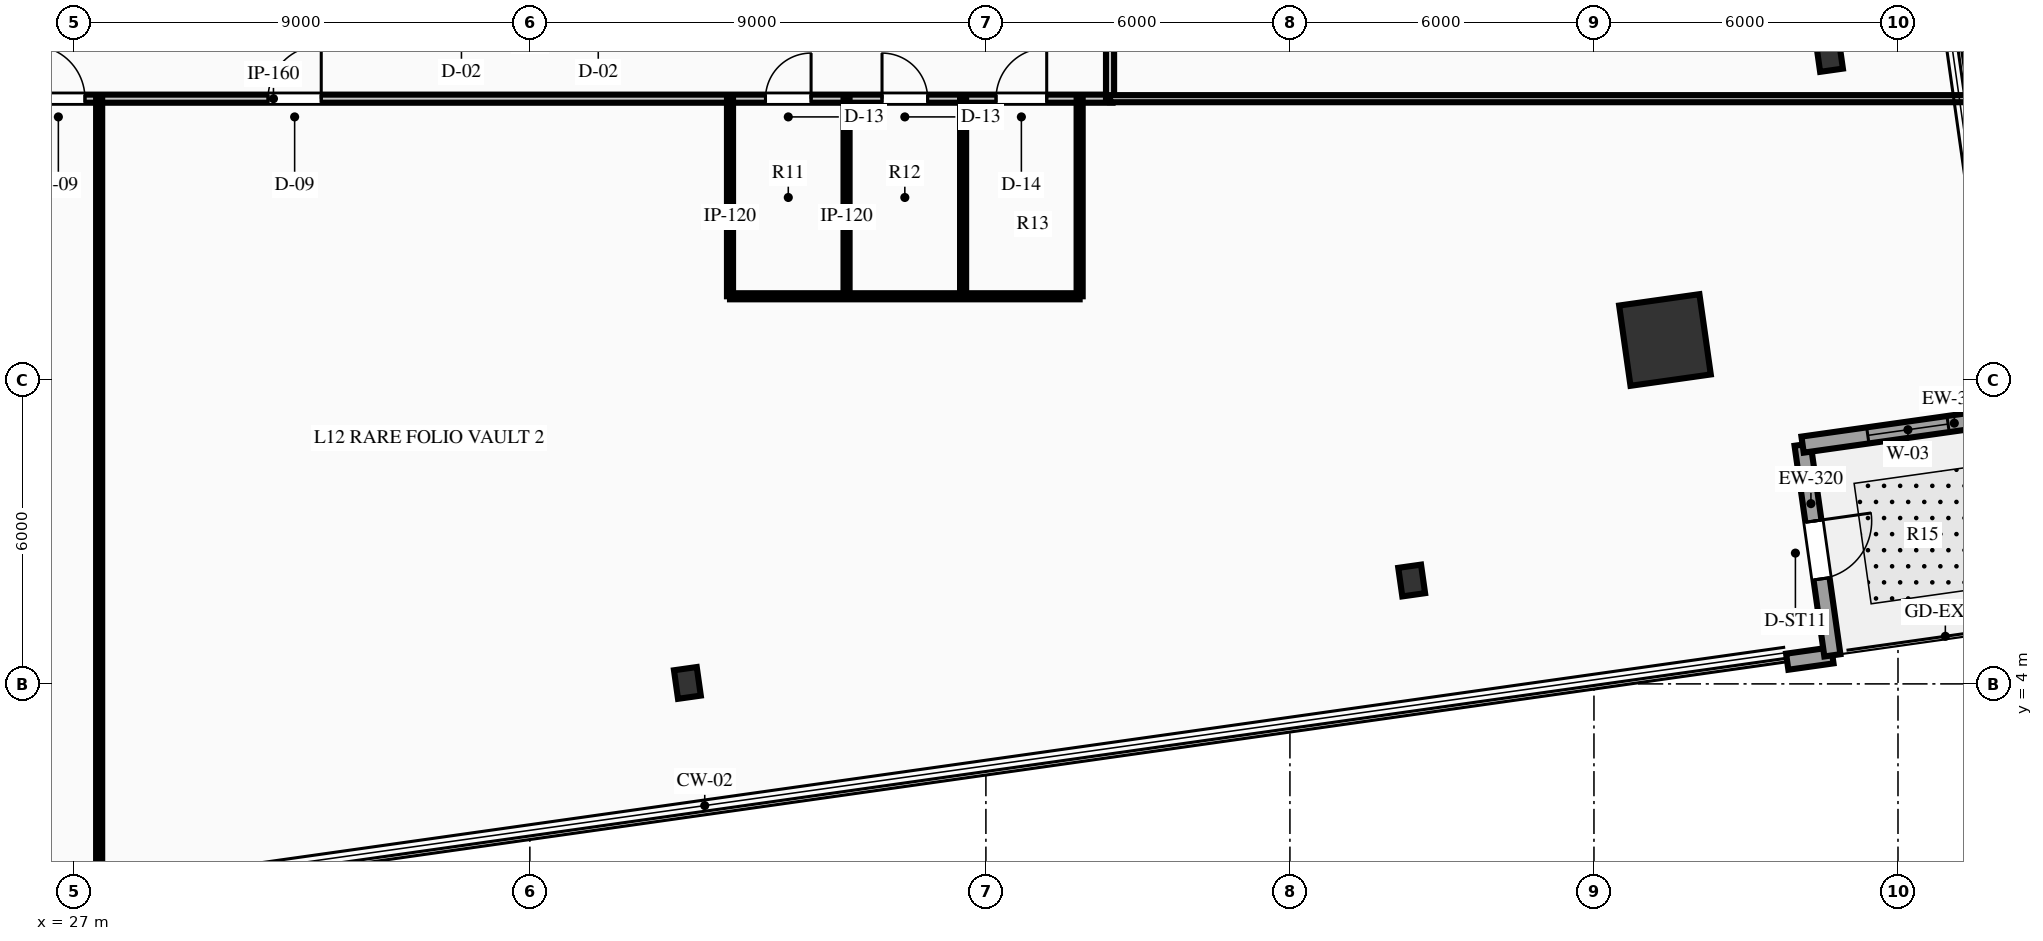
"""IFC4 building model, lengths in metres.
Left out: names, types, materials, properties, quantities, classifications, styles, units other than length and angle.
Written with IfcOpenShell. Run it as: python <this file> out.ifc"""

import sys

from ifc_helpers import new_model, si_unit, direction, frame, frame_2d, origin, origin_2d, place, context, subcontext, project, spatial, rectangle, hollow_rectangle, i_section, extrude, element, fill, save


model = new_model("IFC4")
c1 = context("Model", 3, precision=1e-05, world=origin(), true_north=direction((0.0, 1.0)))
c2 = subcontext(c1, "Body", "Model", "MODEL_VIEW")
j1 = project(units=[si_unit("LENGTHUNIT", "METRE"), si_unit("PLANEANGLEUNIT", "RADIAN")], contexts=[c1])
p1 = place(None, origin())
s1 = spatial("IfcSite", under=j1, at=p1, CompositionType="ELEMENT")
p2 = place(p1, origin())
s2 = spatial("IfcBuilding", under=s1, at=p2, CompositionType="ELEMENT")
p3 = place(p2, frame((0.0, 0.0, 55.2)))
s3 = spatial("IfcBuildingStorey", under=s2, at=p3, CompositionType="ELEMENT", Elevation=55.2)
p4 = place(p3, frame((58.401, 10.787, 0.0), z_axis=(0.0, 0.0, 1.0), x_axis=(0.990146240249, 0.140037219771, 0.0)))
e1 = element("IfcColumn", 1, at=p4, inside=s3, PredefinedType="COLUMN", context=c2, shape_type="SweptSolid", body=[
    extrude(hollow_rectangle(XDim=1.6, YDim=1.6, WallThickness=0.08, at=origin_2d()), origin(), (0.0, 0.0, 1.0), 3.75),
])
for number, where, z_axis, x_axis in (
    (2, (39.109, 4.019, 0.0), (0.0, 0.0, 1.0), (0.99, 0.14, 0.0)),
    (3, (53.403, 6.04, 0.0), (0.0, 0.0, 1.0), (0.99, 0.14, 0.0)),
    (4, (61.648, 16.393, 0.0), (0.0, 0.0, 1.0), (0.99, 0.14, 0.0)),
):
    element("IfcColumn", number, at=place(p3, frame(where, z_axis=z_axis, x_axis=x_axis)), inside=s3, PredefinedType="COLUMN", context=c2, shape_type="SweptSolid", body=[
        extrude(i_section(OverallWidth=0.454, OverallDepth=0.569, WebThickness=0.078, FlangeThickness=0.125, at=origin_2d()), origin(), (0.0, 0.0, 1.0), 3.75),
    ])
p5 = place(p3, frame((61.705, 4.563, 0.0), z_axis=(0.0, 0.0, 1.0), x_axis=(-0.990149293409, -0.140015630419, 0.0)))
e5 = element("IfcWall", 5, at=p5, inside=s3, PredefinedType="STANDARD", context=c2, shape_type="SweptSolid", body=[
    extrude(rectangle(XDim=0.9, YDim=0.32, at=frame_2d((0.45, 0.0))), origin(), (0.0, 0.0, 1.0), 3.44),
])
p6 = place(p3, frame((61.117, 8.722, 0.0), z_axis=(0.0, 0.0, 1.0), x_axis=(0.139972650661, -0.990155370165, 0.0)))
e6 = element("IfcWall", 6, at=p6, inside=s3, PredefinedType="STANDARD", context=c2, shape_type="SweptSolid", body=[
    extrude(rectangle(XDim=4.2, YDim=0.32, at=frame_2d((2.1, 0.0))), origin(), (0.0, 0.0, 1.0), 3.44),
])
p7 = place(p6, frame((1.525, 0.0, 0.0)))
e7 = element("IfcOpeningElement", 7, at=p7, cuts=e6, PredefinedType="OPENING", context=c2, shape_type="SweptSolid", body=[
    extrude(rectangle(XDim=1.15, YDim=2.2, at=frame_2d((0.575, 1.1))), frame((0.0, 0.17, 0.0), z_axis=(0.0, -1.0, 0.0), x_axis=(1.0, 0.0, 0.0)), (0.0, 0.0, 1.0), 0.34),
])
p8 = place(p3, frame((65.276, 9.31, 0.0), z_axis=(0.0, 0.0, 1.0), x_axis=(-0.990146172451, -0.140037699139, 0.0)))
e8 = element("IfcWall", 8, at=p8, inside=s3, PredefinedType="STANDARD", context=c2, shape_type="SweptSolid", body=[
    extrude(rectangle(XDim=4.2, YDim=0.32, at=frame_2d((2.1, 0.0))), origin(), (0.0, 0.0, 1.0), 3.44),
])
p9 = place(p8, frame((1.3, 0.0, 0.85)))
e9 = element("IfcOpeningElement", 9, at=p9, cuts=e8, PredefinedType="OPENING", context=c2, shape_type="SweptSolid", body=[
    extrude(rectangle(XDim=1.6, YDim=2.1, at=frame_2d((0.8, 1.05))), frame((0.0, 0.17, 0.0), z_axis=(0.0, -1.0, 0.0), x_axis=(1.0, 0.0, 0.0)), (0.0, 0.0, 1.0), 0.34),
])
p10 = place(p3, frame((24.5, 15.55, 0.0), z_axis=(0.0, 0.0, 1.0), x_axis=(1.0, 0.0, 0.0)))
e10 = element("IfcWall", 10, at=p10, inside=s3, PredefinedType="PARTITIONING", context=c2, shape_type="SweptSolid", body=[
    extrude(rectangle(XDim=23.0, YDim=0.16, at=frame_2d((11.5, 0.0))), origin(), (0.0, 0.0, 1.0), 3.44),
])
p11 = place(p10, frame((16.15, 0.0, 0.0)))
e11 = element("IfcOpeningElement", 11, at=p11, cuts=e10, PredefinedType="OPENING", context=c2, shape_type="SweptSolid", body=[
    extrude(rectangle(XDim=0.9, YDim=2.15, at=frame_2d((0.45, 1.075))), frame((0.0, 0.09, 0.0), z_axis=(0.0, -1.0, 0.0), x_axis=(1.0, 0.0, 0.0)), (0.0, 0.0, 1.0), 0.18),
])
p12 = place(p10, frame((18.45, 0.0, 0.0)))
e12 = element("IfcOpeningElement", 12, at=p12, cuts=e10, PredefinedType="OPENING", context=c2, shape_type="SweptSolid", body=[
    extrude(rectangle(XDim=0.9, YDim=2.15, at=frame_2d((0.45, 1.075))), frame((0.0, 0.09, 0.0), z_axis=(0.0, -1.0, 0.0), x_axis=(1.0, 0.0, 0.0)), (0.0, 0.0, 1.0), 0.18),
])
p13 = place(p10, frame((20.7, 0.0, 0.0)))
e13 = element("IfcOpeningElement", 13, at=p13, cuts=e10, PredefinedType="OPENING", context=c2, shape_type="SweptSolid", body=[
    extrude(rectangle(XDim=1.0, YDim=2.15, at=frame_2d((0.5, 1.075))), frame((0.0, 0.09, 0.0), z_axis=(0.0, -1.0, 0.0), x_axis=(1.0, 0.0, 0.0)), (0.0, 0.0, 1.0), 0.18),
])
p14 = place(p10, frame((1.67, 0.0, 0.0)))
e14 = element("IfcOpeningElement", 14, at=p14, cuts=e10, PredefinedType="OPENING", context=c2, shape_type="SweptSolid", body=[
    extrude(rectangle(XDim=1.05, YDim=2.15, at=frame_2d((0.525, 1.075))), frame((0.0, 0.09, 0.0), z_axis=(0.0, -1.0, 0.0), x_axis=(1.0, 0.0, 0.0)), (0.0, 0.0, 1.0), 0.18),
])
p15 = place(p10, frame((6.333, 0.0, 0.0)))
e15 = element("IfcOpeningElement", 15, at=p15, cuts=e10, PredefinedType="OPENING", context=c2, shape_type="SweptSolid", body=[
    extrude(rectangle(XDim=1.05, YDim=2.15, at=frame_2d((0.525, 1.075))), frame((0.0, 0.09, 0.0), z_axis=(0.0, -1.0, 0.0), x_axis=(1.0, 0.0, 0.0)), (0.0, 0.0, 1.0), 0.18),
])
p16 = place(p3, frame((47.45, 15.55, 0.0), z_axis=(0.0, 0.0, 1.0), x_axis=(0.0, 1.0, 0.0)))
e16 = element("IfcWall", 16, at=p16, inside=s3, PredefinedType="PARTITIONING", context=c2, shape_type="SweptSolid", body=[
    extrude(rectangle(XDim=20.9, YDim=0.16, at=frame_2d((10.45, 0.0))), origin(), (0.0, 0.0, 1.0), 3.44),
])
p17 = place(p16, frame((14.975, 0.0, 0.0)))
e17 = element("IfcOpeningElement", 17, at=p17, cuts=e16, PredefinedType="OPENING", context=c2, shape_type="SweptSolid", body=[
    extrude(rectangle(XDim=0.95, YDim=2.15, at=frame_2d((0.475, 1.075))), frame((0.0, 0.09, 0.0), z_axis=(0.0, -1.0, 0.0), x_axis=(1.0, 0.0, 0.0)), (0.0, 0.0, 1.0), 0.18),
])
p18 = place(p16, frame((5.54, 0.0, 0.0)))
e18 = element("IfcOpeningElement", 18, at=p18, cuts=e16, PredefinedType="OPENING", context=c2, shape_type="SweptSolid", body=[
    extrude(rectangle(XDim=1.05, YDim=2.15, at=frame_2d((0.525, 1.075))), frame((0.0, 0.09, 0.0), z_axis=(0.0, -1.0, 0.0), x_axis=(1.0, 0.0, 0.0)), (0.0, 0.0, 1.0), 0.18),
])
p19 = place(p16, frame((9.791, 0.0, 0.0)))
e19 = element("IfcOpeningElement", 19, at=p19, cuts=e16, PredefinedType="OPENING", context=c2, shape_type="SweptSolid", body=[
    extrude(rectangle(XDim=1.05, YDim=2.15, at=frame_2d((0.525, 1.075))), frame((0.0, 0.09, 0.0), z_axis=(0.0, -1.0, 0.0), x_axis=(1.0, 0.0, 0.0)), (0.0, 0.0, 1.0), 0.18),
])
for number, where, z_axis, x_axis in (
    (20, (39.95, 11.65, 0.0), (0.0, 0.0, 1.0), (0.0, 1.0, 0.0)),
    (21, (42.25, 11.65, 0.0), (0.0, 0.0, 1.0), (0.0, 1.0, 0.0)),
    (22, (44.55, 11.65, 0.0), (0.0, 0.0, 1.0), (0.0, 1.0, 0.0)),
    (23, (46.85, 11.65, 0.0), (0.0, 0.0, 1.0), (0.0, 1.0, 0.0)),
):
    element("IfcWall", number, at=place(p3, frame(where, z_axis=z_axis, x_axis=x_axis)), inside=s3, PredefinedType="PARTITIONING", context=c2, shape_type="SweptSolid", body=[
        extrude(rectangle(XDim=3.9, YDim=0.12, at=frame_2d((1.95, 0.0))), origin(), (0.0, 0.0, 1.0), 3.44),
    ])
p20 = place(p3, frame((39.95, 11.65, 0.0), z_axis=(0.0, 0.0, 1.0), x_axis=(1.0, 0.0, 0.0)))
e24 = element("IfcWall", 24, at=p20, inside=s3, PredefinedType="PARTITIONING", context=c2, shape_type="SweptSolid", body=[
    extrude(rectangle(XDim=6.9, YDim=0.12, at=frame_2d((3.45, 0.0))), origin(), (0.0, 0.0, 1.0), 3.44),
])
p21 = place(p3, frame((47.45, 15.55, 0.0), z_axis=(0.0, 0.0, 1.0), x_axis=(1.0, 0.0, 0.0)))
e25 = element("IfcWall", 25, at=p21, inside=s3, PredefinedType="PARTITIONING", context=c2, shape_type="SweptSolid", body=[
    extrude(rectangle(XDim=16.903, YDim=0.14, at=frame_2d((8.451, 0.0))), origin(), (0.0, 0.0, 1.0), 3.44),
])
p22 = place(p3, frame((27.5, -0.234, 0.0), z_axis=(0.0, 0.0, 1.0), x_axis=(0.0, 1.0, 0.0)))
e26 = element("IfcWall", 26, at=p22, inside=s3, PredefinedType="PARTITIONING", context=c2, shape_type="SweptSolid", body=[
    extrude(rectangle(XDim=15.784, YDim=0.12, at=frame_2d((7.892, 0.0))), origin(), (0.0, 0.0, 1.0), 3.44),
])
p23 = place(p7, origin())
e27 = element("IfcDoor", 27, at=p23, inside=s3, OperationType="SINGLE_SWING_LEFT", PredefinedType="DOOR", context=c2, shape_type="SweptSolid", body=[
    extrude(rectangle(XDim=1.15, YDim=2.2, at=frame_2d((0.575, 1.1))), frame((0.0, 0.025, 0.0), z_axis=(0.0, -1.0, 0.0), x_axis=(1.0, 0.0, 0.0)), (0.0, 0.0, 1.0), 0.05),
])
fill(e7, e27)
p24 = place(p9, origin())
e28 = element("IfcWindow", 28, at=p24, inside=s3, PartitioningType="SINGLE_PANEL", PredefinedType="WINDOW", context=c2, shape_type="SweptSolid", body=[
    extrude(rectangle(XDim=1.6, YDim=2.1, at=frame_2d((0.8, 1.05))), frame((0.0, 0.03, 0.0), z_axis=(0.0, -1.0, 0.0), x_axis=(1.0, 0.0, 0.0)), (0.0, 0.0, 1.0), 0.06),
])
fill(e9, e28)
p25 = place(p11, origin())
e29 = element("IfcDoor", 29, at=p25, inside=s3, OperationType="SINGLE_SWING_RIGHT", PredefinedType="DOOR", context=c2, shape_type="SweptSolid", body=[
    extrude(rectangle(XDim=0.9, YDim=2.15, at=frame_2d((0.45, 1.075))), frame((0.0, 0.025, 0.0), z_axis=(0.0, -1.0, 0.0), x_axis=(1.0, 0.0, 0.0)), (0.0, 0.0, 1.0), 0.05),
])
fill(e11, e29)
p26 = place(p12, origin())
e30 = element("IfcDoor", 30, at=p26, inside=s3, OperationType="SINGLE_SWING_LEFT", PredefinedType="DOOR", context=c2, shape_type="SweptSolid", body=[
    extrude(rectangle(XDim=0.9, YDim=2.15, at=frame_2d((0.45, 1.075))), frame((0.0, 0.025, 0.0), z_axis=(0.0, -1.0, 0.0), x_axis=(1.0, 0.0, 0.0)), (0.0, 0.0, 1.0), 0.05),
])
fill(e12, e30)
p27 = place(p13, origin())
e31 = element("IfcDoor", 31, at=p27, inside=s3, OperationType="SINGLE_SWING_RIGHT", PredefinedType="DOOR", context=c2, shape_type="SweptSolid", body=[
    extrude(rectangle(XDim=1.0, YDim=2.15, at=frame_2d((0.5, 1.075))), frame((0.0, 0.025, 0.0), z_axis=(0.0, -1.0, 0.0), x_axis=(1.0, 0.0, 0.0)), (0.0, 0.0, 1.0), 0.05),
])
fill(e13, e31)
p28 = place(p14, origin())
e32 = element("IfcDoor", 32, at=p28, inside=s3, OperationType="SINGLE_SWING_LEFT", PredefinedType="DOOR", context=c2, shape_type="SweptSolid", body=[
    extrude(rectangle(XDim=1.05, YDim=2.15, at=frame_2d((0.525, 1.075))), frame((0.0, 0.025, 0.0), z_axis=(0.0, -1.0, 0.0), x_axis=(1.0, 0.0, 0.0)), (0.0, 0.0, 1.0), 0.05),
])
fill(e14, e32)
p29 = place(p15, origin())
e33 = element("IfcDoor", 33, at=p29, inside=s3, OperationType="SINGLE_SWING_RIGHT", PredefinedType="DOOR", context=c2, shape_type="SweptSolid", body=[
    extrude(rectangle(XDim=1.05, YDim=2.15, at=frame_2d((0.525, 1.075))), frame((0.0, 0.025, 0.0), z_axis=(0.0, -1.0, 0.0), x_axis=(1.0, 0.0, 0.0)), (0.0, 0.0, 1.0), 0.05),
])
fill(e15, e33)
save(model, sys.argv[1])
